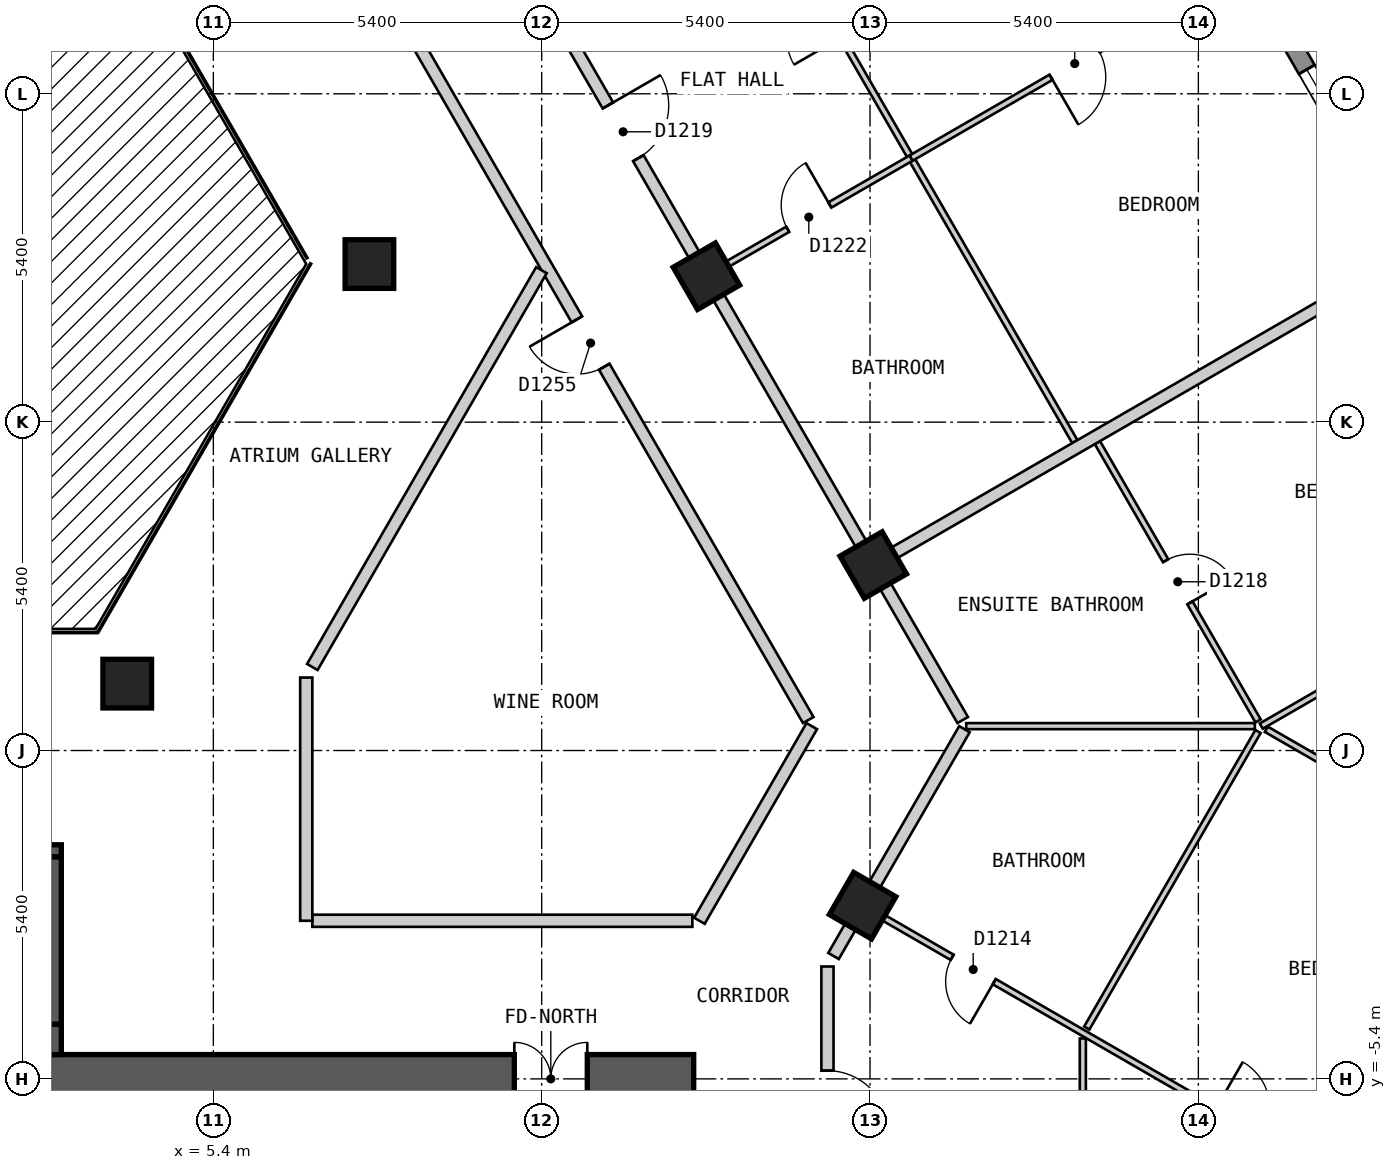
"""IFC4 building model, lengths in metres.
Left out: names, types, materials, properties, quantities, classifications, styles, units other than length and angle.
Written with IfcOpenShell. Run it as: python <this file> out.ifc"""

import sys

from ifc_helpers import new_model, si_unit, direction, frame, frame_2d, origin, origin_2d, place, context, subcontext, project, spatial, polyline, rectangle, outline, extrude, element, fill, save


model = new_model("IFC4")
c1 = context("Model", 3, precision=1e-05, world=origin(), true_north=direction((0.0, 1.0)))
c2 = subcontext(c1, "Body", "Model", "MODEL_VIEW")
j1 = project(units=[si_unit("LENGTHUNIT", "METRE"), si_unit("PLANEANGLEUNIT", "RADIAN")], contexts=[c1])
p1 = place(None, origin())
s1 = spatial("IfcSite", under=j1, at=p1, CompositionType="ELEMENT")
p2 = place(p1, origin())
s2 = spatial("IfcBuilding", under=s1, at=p2, CompositionType="ELEMENT")
p3 = place(p2, frame((0.0, 0.0, 117.6)))
s3 = spatial("IfcBuildingStorey", under=s2, at=p3, CompositionType="ELEMENT", Elevation=117.6)
for number, where, z_axis, x_axis in (
    (1, (16.078, -2.551, 0.0), (0.0, 0.0, 1.0), (0.5, 0.866, 0.0)),
    (2, (16.253, 3.05, 0.0), (0.0, 0.0, 1.0), (-0.5, 0.866, 0.0)),
    (3, (3.984, 1.1, 0.0), (0.0, 0.0, 1.0), (1.0, 0.0, 0.0)),
    (4, (13.51, 7.8, 0.0), (0.0, 0.0, 1.0), (-0.5, 0.866, 0.0)),
    (5, (7.967, 8.0, 0.0), (0.0, 0.0, 1.0), (1.0, 0.0, 0.0)),
):
    element("IfcColumn", number, at=place(p3, frame(where, z_axis=z_axis, x_axis=x_axis)), inside=s3, PredefinedType="COLUMN", context=c2, shape_type="SweptSolid", body=[
        extrude(rectangle(XDim=0.8, YDim=0.8, at=origin_2d()), origin(), (0.0, 0.0, 1.0), 3.0),
    ])
p4 = place(p3, frame((-13.3, -5.4, 0.0), z_axis=(0.0, 0.0, 1.0), x_axis=(1.0, 0.0, 0.0)))
e6 = element("IfcWall", 6, at=p4, inside=s3, PredefinedType="SHEAR", context=c2, shape_type="SweptSolid", body=[
    extrude(rectangle(XDim=26.6, YDim=0.8, at=frame_2d((13.3, 0.0))), origin(), (0.0, 0.0, 1.0), 2.7),
])
p5 = place(p4, frame((23.65, 0.0, 0.0)))
e7 = element("IfcOpeningElement", 7, at=p5, cuts=e6, PredefinedType="OPENING", context=c2, shape_type="SweptSolid", body=[
    extrude(rectangle(XDim=1.2, YDim=2.1, at=frame_2d((0.6, 1.05))), frame((0.0, 0.41, 0.0), z_axis=(0.0, -1.0, 0.0), x_axis=(1.0, 0.0, 0.0)), (0.0, 0.0, 1.0), 0.82),
])
p6 = place(p3, frame((15.862, -23.425, 0.0), z_axis=(0.0, 0.0, 1.0), x_axis=(0.500017503135, 0.866015298109, 0.0)))
e8 = element("IfcWall", 8, at=p6, inside=s3, PredefinedType="SOLIDWALL", context=c2, shape_type="SweptSolid", body=[
    extrude(outline(polyline([(0.0, -0.15), (24.711, -0.15), (24.631, 0.15), (0.08, 0.15), (0.0, -0.15)])), origin(), (0.0, 0.0, 1.0), 2.7),
])
p7 = place(p6, frame((2.857, 0.0, 0.15)))
e9 = element("IfcOpeningElement", 9, at=p7, cuts=e8, PredefinedType="OPENING", context=c2, shape_type="SweptSolid", body=[
    extrude(rectangle(XDim=1.5, YDim=2.1, at=frame_2d((0.75, 1.05))), frame((0.0, 0.16, 0.0), z_axis=(0.0, -1.0, 0.0), x_axis=(1.0, 0.0, 0.0)), (0.0, 0.0, 1.0), 0.32),
])
p8 = place(p6, frame((8.689, 0.0, 0.15)))
e10 = element("IfcOpeningElement", 10, at=p8, cuts=e8, PredefinedType="OPENING", context=c2, shape_type="SweptSolid", body=[
    extrude(rectangle(XDim=1.5, YDim=2.1, at=frame_2d((0.75, 1.05))), frame((0.0, 0.16, 0.0), z_axis=(0.0, -1.0, 0.0), x_axis=(1.0, 0.0, 0.0)), (0.0, 0.0, 1.0), 0.32),
])
p9 = place(p6, frame((14.52, 0.0, 0.15)))
e11 = element("IfcOpeningElement", 11, at=p9, cuts=e8, PredefinedType="OPENING", context=c2, shape_type="SweptSolid", body=[
    extrude(rectangle(XDim=1.5, YDim=2.1, at=frame_2d((0.75, 1.05))), frame((0.0, 0.16, 0.0), z_axis=(0.0, -1.0, 0.0), x_axis=(1.0, 0.0, 0.0)), (0.0, 0.0, 1.0), 0.32),
])
p10 = place(p6, frame((20.351, 0.0, 0.15)))
e12 = element("IfcOpeningElement", 12, at=p10, cuts=e8, PredefinedType="OPENING", context=c2, shape_type="SweptSolid", body=[
    extrude(rectangle(XDim=1.5, YDim=2.1, at=frame_2d((0.75, 1.05))), frame((0.0, 0.16, 0.0), z_axis=(0.0, -1.0, 0.0), x_axis=(1.0, 0.0, 0.0)), (0.0, 0.0, 1.0), 0.32),
])
p11 = place(p3, frame((28.218, 2.825, 0.0), z_axis=(0.0, 0.0, 1.0), x_axis=(-0.500020536353, 0.866013546791, 0.0)))
e13 = element("IfcWall", 13, at=p11, inside=s3, PredefinedType="SOLIDWALL", context=c2, shape_type="SweptSolid", body=[
    extrude(outline(polyline([(0.0, -0.15), (23.325, -0.15), (23.245, 0.15), (0.08, 0.15), (0.0, -0.15)])), origin(), (0.0, 0.0, 1.0), 2.7),
])
p12 = place(p11, frame((2.685, 0.0, 0.15)))
e14 = element("IfcOpeningElement", 14, at=p12, cuts=e13, PredefinedType="OPENING", context=c2, shape_type="SweptSolid", body=[
    extrude(rectangle(XDim=1.5, YDim=2.1, at=frame_2d((0.75, 1.05))), frame((0.0, 0.16, 0.0), z_axis=(0.0, -1.0, 0.0), x_axis=(1.0, 0.0, 0.0)), (0.0, 0.0, 1.0), 0.32),
])
p13 = place(p11, frame((8.17, 0.0, 0.15)))
e15 = element("IfcOpeningElement", 15, at=p13, cuts=e13, PredefinedType="OPENING", context=c2, shape_type="SweptSolid", body=[
    extrude(rectangle(XDim=1.5, YDim=2.1, at=frame_2d((0.75, 1.05))), frame((0.0, 0.16, 0.0), z_axis=(0.0, -1.0, 0.0), x_axis=(1.0, 0.0, 0.0)), (0.0, 0.0, 1.0), 0.32),
])
p14 = place(p11, frame((13.655, 0.0, 0.15)))
e16 = element("IfcOpeningElement", 16, at=p14, cuts=e13, PredefinedType="OPENING", context=c2, shape_type="SweptSolid", body=[
    extrude(rectangle(XDim=1.5, YDim=2.1, at=frame_2d((0.75, 1.05))), frame((0.0, 0.16, 0.0), z_axis=(0.0, -1.0, 0.0), x_axis=(1.0, 0.0, 0.0)), (0.0, 0.0, 1.0), 0.32),
])
p15 = place(p11, frame((19.14, 0.0, 0.15)))
e17 = element("IfcOpeningElement", 17, at=p15, cuts=e13, PredefinedType="OPENING", context=c2, shape_type="SweptSolid", body=[
    extrude(rectangle(XDim=1.5, YDim=2.1, at=frame_2d((0.75, 1.05))), frame((0.0, 0.16, 0.0), z_axis=(0.0, -1.0, 0.0), x_axis=(1.0, 0.0, 0.0)), (0.0, 0.0, 1.0), 0.32),
])
p16 = place(p3, frame((-2.9, -4.75, 0.0), z_axis=(0.0, 0.0, 1.0), x_axis=(1.0, 0.0, 0.0)))
e18 = element("IfcWall", 18, at=p16, inside=s3, PredefinedType="SOLIDWALL", context=c2, shape_type="SweptSolid", body=[
    extrude(rectangle(XDim=5.8, YDim=0.5, at=frame_2d((2.9, 0.0))), origin(), (0.0, 0.0, 1.0), 2.7),
])
p17 = place(p3, frame((-2.9, -1.65, 0.0), z_axis=(0.0, 0.0, 1.0), x_axis=(1.0, 0.0, 0.0)))
e19 = element("IfcWall", 19, at=p17, inside=s3, PredefinedType="SOLIDWALL", context=c2, shape_type="SweptSolid", body=[
    extrude(rectangle(XDim=5.8, YDim=0.2, at=frame_2d((2.9, 0.0))), origin(), (0.0, 0.0, 1.0), 2.7),
])
p18 = place(p17, frame((0.3, 0.0, 0.0)))
e20 = element("IfcOpeningElement", 20, at=p18, cuts=e19, PredefinedType="OPENING", context=c2, shape_type="SweptSolid", body=[
    extrude(rectangle(XDim=1.2, YDim=2.1, at=frame_2d((0.6, 1.05))), frame((0.0, 0.11, 0.0), z_axis=(0.0, -1.0, 0.0), x_axis=(1.0, 0.0, 0.0)), (0.0, 0.0, 1.0), 0.22),
])
p19 = place(p3, frame((2.8, -4.5, 0.0), z_axis=(0.0, 0.0, 1.0), x_axis=(0.0, 1.0, 0.0)))
e21 = element("IfcWall", 21, at=p19, inside=s3, PredefinedType="SOLIDWALL", context=c2, shape_type="SweptSolid", body=[
    extrude(rectangle(XDim=2.75, YDim=0.2, at=frame_2d((1.375, 0.0))), origin(), (0.0, 0.0, 1.0), 2.7),
])
p20 = place(p3, frame((7.967, 13.0, 0.0), z_axis=(0.0, 0.0, 1.0), x_axis=(0.50003774998, -0.866003607726, 0.0)))
e22 = element("IfcWall", 22, at=p20, inside=s3, PredefinedType="PARTITIONING", context=c2, shape_type="SweptSolid", body=[
    extrude(rectangle(XDim=14.433, YDim=0.2, at=frame_2d((7.217, 0.0))), origin(), (0.0, 0.0, 1.0), 2.7),
])
p21 = place(p20, frame((6.824, 0.0, 0.0)))
e23 = element("IfcOpeningElement", 23, at=p21, cuts=e22, PredefinedType="OPENING", context=c2, shape_type="SweptSolid", body=[
    extrude(rectangle(XDim=0.9, YDim=2.1, at=frame_2d((0.45, 1.05))), frame((0.0, 0.11, 0.0), z_axis=(0.0, -1.0, 0.0), x_axis=(1.0, 0.0, 0.0)), (0.0, 0.0, 1.0), 0.22),
])
p22 = place(p3, frame((9.296, 15.1, 0.0), z_axis=(0.0, 0.0, 1.0), x_axis=(0.499974024244, -0.866040400375, 0.0)))
e24 = element("IfcWall", 24, at=p22, inside=s3, PredefinedType="PARTITIONING", context=c2, shape_type="SweptSolid", body=[
    extrude(rectangle(XDim=16.857, YDim=0.2, at=frame_2d((8.429, 0.0))), origin(), (0.0, 0.0, 1.0), 2.7),
])
p23 = place(p22, frame((5.187, 0.0, 0.0)))
e25 = element("IfcOpeningElement", 25, at=p23, cuts=e24, PredefinedType="OPENING", context=c2, shape_type="SweptSolid", body=[
    extrude(rectangle(XDim=1.0, YDim=2.1, at=frame_2d((0.5, 1.05))), frame((0.0, 0.11, 0.0), z_axis=(0.0, -1.0, 0.0), x_axis=(1.0, 0.0, 0.0)), (0.0, 0.0, 1.0), 0.22),
])
p24 = place(p3, frame((7.028, -2.8, 0.0), z_axis=(0.0, 0.0, 1.0), x_axis=(1.0, 0.0, 0.0)))
e26 = element("IfcWall", 26, at=p24, inside=s3, PredefinedType="PARTITIONING", context=c2, shape_type="SweptSolid", body=[
    extrude(rectangle(XDim=6.25, YDim=0.2, at=frame_2d((3.125, 0.0))), origin(), (0.0, 0.0, 1.0), 2.7),
])
p25 = place(p3, frame((7.028, 1.373, 0.0), z_axis=(0.0, 0.0, 1.0), x_axis=(0.499954271211, 0.866051803703, 0.0)))
e27 = element("IfcWall", 27, at=p25, inside=s3, PredefinedType="PARTITIONING", context=c2, shape_type="SweptSolid", body=[
    extrude(rectangle(XDim=7.536, YDim=0.2, at=frame_2d((3.768, 0.0))), origin(), (0.0, 0.0, 1.0), 2.7),
])
p26 = place(p3, frame((13.394, -2.8, 0.0), z_axis=(0.0, 0.0, 1.0), x_axis=(0.499968324138, 0.866043691079, 0.0)))
e28 = element("IfcWall", 28, at=p26, inside=s3, PredefinedType="PARTITIONING", context=c2, shape_type="SweptSolid", body=[
    extrude(rectangle(XDim=3.696, YDim=0.2, at=frame_2d((1.848, 0.0))), origin(), (0.0, 0.0, 1.0), 2.7),
])
p27 = place(p3, frame((15.6, -3.379, 0.0), z_axis=(0.0, 0.0, 1.0), x_axis=(0.499882759391, 0.866093082101, 0.0)))
e29 = element("IfcWall", 29, at=p27, inside=s3, PredefinedType="PARTITIONING", context=c2, shape_type="SweptSolid", body=[
    extrude(rectangle(XDim=4.307, YDim=0.2, at=frame_2d((2.153, 0.0))), origin(), (0.0, 0.0, 1.0), 2.7),
])
p28 = place(p3, frame((6.928, -2.8, 0.0), z_axis=(0.0, 0.0, 1.0), x_axis=(0.0, 1.0, 0.0)))
e30 = element("IfcWall", 30, at=p28, inside=s3, PredefinedType="PARTITIONING", context=c2, shape_type="SweptSolid", body=[
    extrude(rectangle(XDim=4.0, YDim=0.2, at=frame_2d((2.0, 0.0))), origin(), (0.0, 0.0, 1.0), 2.7),
])
p29 = place(p3, frame((15.5, -21.199, 0.0), z_axis=(0.0, 0.0, 1.0), x_axis=(0.0, 1.0, 0.0)))
e31 = element("IfcWall", 31, at=p29, inside=s3, PredefinedType="PARTITIONING", context=c2, shape_type="SweptSolid", body=[
    extrude(rectangle(XDim=17.647, YDim=0.2, at=frame_2d((8.823, 0.0))), origin(), (0.0, 0.0, 1.0), 2.7),
])
p30 = place(p29, frame((14.934, 0.0, 0.0)))
e32 = element("IfcOpeningElement", 32, at=p30, cuts=e31, PredefinedType="OPENING", context=c2, shape_type="SweptSolid", body=[
    extrude(rectangle(XDim=1.0, YDim=2.1, at=frame_2d((0.5, 1.05))), frame((0.0, 0.11, 0.0), z_axis=(0.0, -1.0, 0.0), x_axis=(1.0, 0.0, 0.0)), (0.0, 0.0, 1.0), 0.22),
])
p31 = place(p3, frame((11.539, 18.986, 0.0), z_axis=(0.0, 0.0, 1.0), x_axis=(0.500019453803, -0.866014171835, 0.0)))
e33 = element("IfcWall", 33, at=p31, inside=s3, PredefinedType="PARTITIONING", context=c2, shape_type="SweptSolid", body=[
    extrude(rectangle(XDim=16.057, YDim=0.1, at=frame_2d((8.029, 0.0))), origin(), (0.0, 0.0, 1.0), 2.7),
])
p32 = place(p31, frame((7.48, 0.0, 0.0)))
e34 = element("IfcOpeningElement", 34, at=p32, cuts=e33, PredefinedType="OPENING", context=c2, shape_type="SweptSolid", body=[
    extrude(rectangle(XDim=0.9, YDim=2.1, at=frame_2d((0.45, 1.05))), frame((0.0, 0.06, 0.0), z_axis=(0.0, -1.0, 0.0), x_axis=(1.0, 0.0, 0.0)), (0.0, 0.0, 1.0), 0.12),
])
p33 = place(p3, frame((19.94, 5.063, 0.0), z_axis=(0.0, 0.0, 1.0), x_axis=(0.500025085526, -0.866010920165, 0.0)))
e35 = element("IfcWall", 35, at=p33, inside=s3, PredefinedType="PARTITIONING", context=c2, shape_type="SweptSolid", body=[
    extrude(rectangle(XDim=5.284, YDim=0.1, at=frame_2d((2.642, 0.0))), origin(), (0.0, 0.0, 1.0), 2.7),
])
p34 = place(p33, frame((2.242, 0.0, 0.0)))
e36 = element("IfcOpeningElement", 36, at=p34, cuts=e35, PredefinedType="OPENING", context=c2, shape_type="SweptSolid", body=[
    extrude(rectangle(XDim=0.8, YDim=2.1, at=frame_2d((0.4, 1.05))), frame((0.0, 0.06, 0.0), z_axis=(0.0, -1.0, 0.0), x_axis=(1.0, 0.0, 0.0)), (0.0, 0.0, 1.0), 0.12),
])
p35 = place(p3, frame((16.165, -2.601, 0.0), z_axis=(0.0, 0.0, 1.0), x_axis=(0.866016855193, -0.500014806302, 0.0)))
e37 = element("IfcWall", 37, at=p35, inside=s3, PredefinedType="PARTITIONING", context=c2, shape_type="SweptSolid", body=[
    extrude(rectangle(XDim=10.0, YDim=0.1, at=frame_2d((5.0, 0.0))), origin(), (0.0, 0.0, 1.0), 2.7),
])
p36 = place(p35, frame((1.6, 0.0, 0.0)))
e38 = element("IfcOpeningElement", 38, at=p36, cuts=e37, PredefinedType="OPENING", context=c2, shape_type="SweptSolid", body=[
    extrude(rectangle(XDim=0.8, YDim=2.1, at=frame_2d((0.4, 1.05))), frame((0.0, 0.06, 0.0), z_axis=(0.0, -1.0, 0.0), x_axis=(1.0, 0.0, 0.0)), (0.0, 0.0, 1.0), 0.12),
])
p37 = place(p35, frame((6.6, 0.0, 0.0)))
e39 = element("IfcOpeningElement", 39, at=p37, cuts=e37, PredefinedType="OPENING", context=c2, shape_type="SweptSolid", body=[
    extrude(rectangle(XDim=0.9, YDim=2.1, at=frame_2d((0.45, 1.05))), frame((0.0, 0.06, 0.0), z_axis=(0.0, -1.0, 0.0), x_axis=(1.0, 0.0, 0.0)), (0.0, 0.0, 1.0), 0.12),
])
p38 = place(p3, frame((22.718, 0.349, 0.0), z_axis=(0.0, 0.0, 1.0), x_axis=(0.86601454848, -0.500018801468, 0.0)))
e40 = element("IfcWall", 40, at=p38, inside=s3, PredefinedType="PARTITIONING", context=c2, shape_type="SweptSolid", body=[
    extrude(rectangle(XDim=5.8, YDim=0.1, at=frame_2d((2.9, 0.0))), origin(), (0.0, 0.0, 1.0), 2.7),
])
p39 = place(p38, frame((2.4, 0.0, 0.0)))
e41 = element("IfcOpeningElement", 41, at=p39, cuts=e40, PredefinedType="OPENING", context=c2, shape_type="SweptSolid", body=[
    extrude(rectangle(XDim=0.9, YDim=2.1, at=frame_2d((0.45, 1.05))), frame((0.0, 0.06, 0.0), z_axis=(0.0, -1.0, 0.0), x_axis=(1.0, 0.0, 0.0)), (0.0, 0.0, 1.0), 0.12),
])
p40 = place(p3, frame((17.782, 0.401, 0.0), z_axis=(0.0, 0.0, 1.0), x_axis=(1.0, 0.0, 0.0)))
e42 = element("IfcWall", 42, at=p40, inside=s3, PredefinedType="PARTITIONING", context=c2, shape_type="SweptSolid", body=[
    extrude(rectangle(XDim=4.747, YDim=0.1, at=frame_2d((2.374, 0.0))), origin(), (0.0, 0.0, 1.0), 2.7),
])
p41 = place(p3, frame((19.765, -4.564, 0.0), z_axis=(0.0, 0.0, 1.0), x_axis=(0.500060182325, 0.865990654714, 0.0)))
e43 = element("IfcWall", 43, at=p41, inside=s3, PredefinedType="PARTITIONING", context=c2, shape_type="SweptSolid", body=[
    extrude(rectangle(XDim=5.632, YDim=0.1, at=frame_2d((2.816, 0.0))), origin(), (0.0, 0.0, 1.0), 2.7),
])
p42 = place(p3, frame((19.7, -16.477, 0.0), z_axis=(0.0, 0.0, 1.0), x_axis=(0.0, 1.0, 0.0)))
e44 = element("IfcWall", 44, at=p42, inside=s3, PredefinedType="PARTITIONING", context=c2, shape_type="SweptSolid", body=[
    extrude(rectangle(XDim=11.742, YDim=0.1, at=frame_2d((5.871, 0.0))), origin(), (0.0, 0.0, 1.0), 2.7),
])
p43 = place(p42, frame((7.991, 0.0, 0.0)))
e45 = element("IfcOpeningElement", 45, at=p43, cuts=e44, PredefinedType="OPENING", context=c2, shape_type="SweptSolid", body=[
    extrude(rectangle(XDim=0.9, YDim=2.1, at=frame_2d((0.45, 1.05))), frame((0.0, 0.06, 0.0), z_axis=(0.0, -1.0, 0.0), x_axis=(1.0, 0.0, 0.0)), (0.0, 0.0, 1.0), 0.12),
])
p44 = place(p3, frame((22.634, 0.401, 0.0), z_axis=(0.0, 0.0, 1.0), x_axis=(0.86601325737, 0.500021037617, 0.0)))
e46 = element("IfcWall", 46, at=p44, inside=s3, PredefinedType="PARTITIONING", context=c2, shape_type="SweptSolid", body=[
    extrude(rectangle(XDim=5.898, YDim=0.1, at=frame_2d((2.949, 0.0))), origin(), (0.0, 0.0, 1.0), 2.7),
])
p45 = place(p44, frame((2.499, 0.0, 0.0)))
e47 = element("IfcOpeningElement", 47, at=p45, cuts=e46, PredefinedType="OPENING", context=c2, shape_type="SweptSolid", body=[
    extrude(rectangle(XDim=0.9, YDim=2.1, at=frame_2d((0.45, 1.05))), frame((0.0, 0.06, 0.0), z_axis=(0.0, -1.0, 0.0), x_axis=(1.0, 0.0, 0.0)), (0.0, 0.0, 1.0), 0.12),
])
p46 = place(p3, frame((13.597, 7.85, 0.0), z_axis=(0.0, 0.0, 1.0), x_axis=(0.8660642533, 0.499932704626, 0.0)))
e48 = element("IfcWall", 48, at=p46, inside=s3, PredefinedType="PARTITIONING", context=c2, shape_type="SweptSolid", body=[
    extrude(rectangle(XDim=3.786, YDim=0.1, at=frame_2d((1.893, 0.0))), origin(), (0.0, 0.0, 1.0), 2.7),
])
p47 = place(p46, frame((1.443, 0.0, 0.0)))
e49 = element("IfcOpeningElement", 49, at=p47, cuts=e48, PredefinedType="OPENING", context=c2, shape_type="SweptSolid", body=[
    extrude(rectangle(XDim=0.8, YDim=2.1, at=frame_2d((0.4, 1.05))), frame((0.0, 0.06, 0.0), z_axis=(0.0, -1.0, 0.0), x_axis=(1.0, 0.0, 0.0)), (0.0, 0.0, 1.0), 0.12),
])
p48 = place(p3, frame((16.339, 3.1, 0.0), z_axis=(0.0, 0.0, 1.0), x_axis=(0.866016855193, 0.500014806302, 0.0)))
e50 = element("IfcWall", 50, at=p48, inside=s3, PredefinedType="PARTITIONING", context=c2, shape_type="SweptSolid", body=[
    extrude(rectangle(XDim=10.0, YDim=0.2, at=frame_2d((5.0, 0.0))), origin(), (0.0, 0.0, 1.0), 2.7),
])
p49 = place(p3, frame((16.876, 9.743, 0.0), z_axis=(0.0, 0.0, 1.0), x_axis=(0.865997794851, 0.500047817026, 0.0)))
e51 = element("IfcWall", 51, at=p49, inside=s3, PredefinedType="PARTITIONING", context=c2, shape_type="SweptSolid", body=[
    extrude(rectangle(XDim=6.214, YDim=0.1, at=frame_2d((3.107, 0.0))), origin(), (0.0, 0.0, 1.0), 2.7),
])
p50 = place(p49, frame((2.657, 0.0, 0.0)))
e52 = element("IfcOpeningElement", 52, at=p50, cuts=e51, PredefinedType="OPENING", context=c2, shape_type="SweptSolid", body=[
    extrude(rectangle(XDim=0.9, YDim=2.1, at=frame_2d((0.45, 1.05))), frame((0.0, 0.06, 0.0), z_axis=(0.0, -1.0, 0.0), x_axis=(1.0, 0.0, 0.0)), (0.0, 0.0, 1.0), 0.12),
])
p51 = place(p13, origin())
e53 = element("IfcWindow", 53, at=p51, inside=s3, PartitioningType="SINGLE_PANEL", PredefinedType="WINDOW", context=c2, shape_type="SweptSolid", body=[
    extrude(rectangle(XDim=1.5, YDim=2.1, at=frame_2d((0.75, 1.05))), frame((0.0, 0.03, 0.0), z_axis=(0.0, -1.0, 0.0), x_axis=(1.0, 0.0, 0.0)), (0.0, 0.0, 1.0), 0.06),
])
fill(e15, e53)
p52 = place(p30, origin())
e54 = element("IfcDoor", 54, at=p52, inside=s3, OperationType="SINGLE_SWING_LEFT", PredefinedType="DOOR", context=c2, shape_type="SweptSolid", body=[
    extrude(rectangle(XDim=1.0, YDim=2.1, at=frame_2d((0.5, 1.05))), frame((0.0, 0.025, 0.0), z_axis=(0.0, -1.0, 0.0), x_axis=(1.0, 0.0, 0.0)), (0.0, 0.0, 1.0), 0.05),
])
fill(e32, e54)
p53 = place(p36, origin())
e55 = element("IfcDoor", 55, at=p53, inside=s3, OperationType="SINGLE_SWING_RIGHT", PredefinedType="DOOR", context=c2, shape_type="SweptSolid", body=[
    extrude(rectangle(XDim=0.8, YDim=2.1, at=frame_2d((0.4, 1.05))), frame((0.0, 0.025, 0.0), z_axis=(0.0, -1.0, 0.0), x_axis=(1.0, 0.0, 0.0)), (0.0, 0.0, 1.0), 0.05),
])
fill(e38, e55)
p54 = place(p34, origin())
e56 = element("IfcDoor", 56, at=p54, inside=s3, OperationType="SINGLE_SWING_RIGHT", PredefinedType="DOOR", context=c2, shape_type="SweptSolid", body=[
    extrude(rectangle(XDim=0.8, YDim=2.1, at=frame_2d((0.4, 1.05))), frame((0.0, 0.025, 0.0), z_axis=(0.0, -1.0, 0.0), x_axis=(1.0, 0.0, 0.0)), (0.0, 0.0, 1.0), 0.05),
])
fill(e36, e56)
p55 = place(p23, origin())
e57 = element("IfcDoor", 57, at=p55, inside=s3, OperationType="SINGLE_SWING_LEFT", PredefinedType="DOOR", context=c2, shape_type="SweptSolid", body=[
    extrude(rectangle(XDim=1.0, YDim=2.1, at=frame_2d((0.5, 1.05))), frame((0.0, 0.025, 0.0), z_axis=(0.0, -1.0, 0.0), x_axis=(1.0, 0.0, 0.0)), (0.0, 0.0, 1.0), 0.05),
])
fill(e25, e57)
p56 = place(p47, origin())
e58 = element("IfcDoor", 58, at=p56, inside=s3, OperationType="SINGLE_SWING_RIGHT", PredefinedType="DOOR", context=c2, shape_type="SweptSolid", body=[
    extrude(rectangle(XDim=0.8, YDim=2.1, at=frame_2d((0.4, 1.05))), frame((0.0, 0.025, 0.0), z_axis=(0.0, -1.0, 0.0), x_axis=(1.0, 0.0, 0.0)), (0.0, 0.0, 1.0), 0.05),
])
fill(e49, e58)
p57 = place(p50, origin())
e59 = element("IfcDoor", 59, at=p57, inside=s3, OperationType="SINGLE_SWING_LEFT", PredefinedType="DOOR", context=c2, shape_type="SweptSolid", body=[
    extrude(rectangle(XDim=0.9, YDim=2.1, at=frame_2d((0.45, 1.05))), frame((0.0, 0.025, 0.0), z_axis=(0.0, -1.0, 0.0), x_axis=(1.0, 0.0, 0.0)), (0.0, 0.0, 1.0), 0.05),
])
fill(e52, e59)
p58 = place(p21, origin())
e60 = element("IfcDoor", 60, at=p58, inside=s3, OperationType="SINGLE_SWING_LEFT", PredefinedType="DOOR", context=c2, shape_type="SweptSolid", body=[
    extrude(rectangle(XDim=0.9, YDim=2.1, at=frame_2d((0.45, 1.05))), frame((0.0, 0.025, 0.0), z_axis=(0.0, -1.0, 0.0), x_axis=(1.0, 0.0, 0.0)), (0.0, 0.0, 1.0), 0.05),
])
fill(e23, e60)
p59 = place(p5, origin())
e61 = element("IfcDoor", 61, at=p59, inside=s3, OperationType="DOUBLE_DOOR_SINGLE_SWING", PredefinedType="DOOR", context=c2, shape_type="SweptSolid", body=[
    extrude(rectangle(XDim=1.2, YDim=2.1, at=frame_2d((0.6, 1.05))), frame((0.0, 0.025, 0.0), z_axis=(0.0, -1.0, 0.0), x_axis=(1.0, 0.0, 0.0)), (0.0, 0.0, 1.0), 0.05),
])
fill(e7, e61)
save(model, sys.argv[1])
